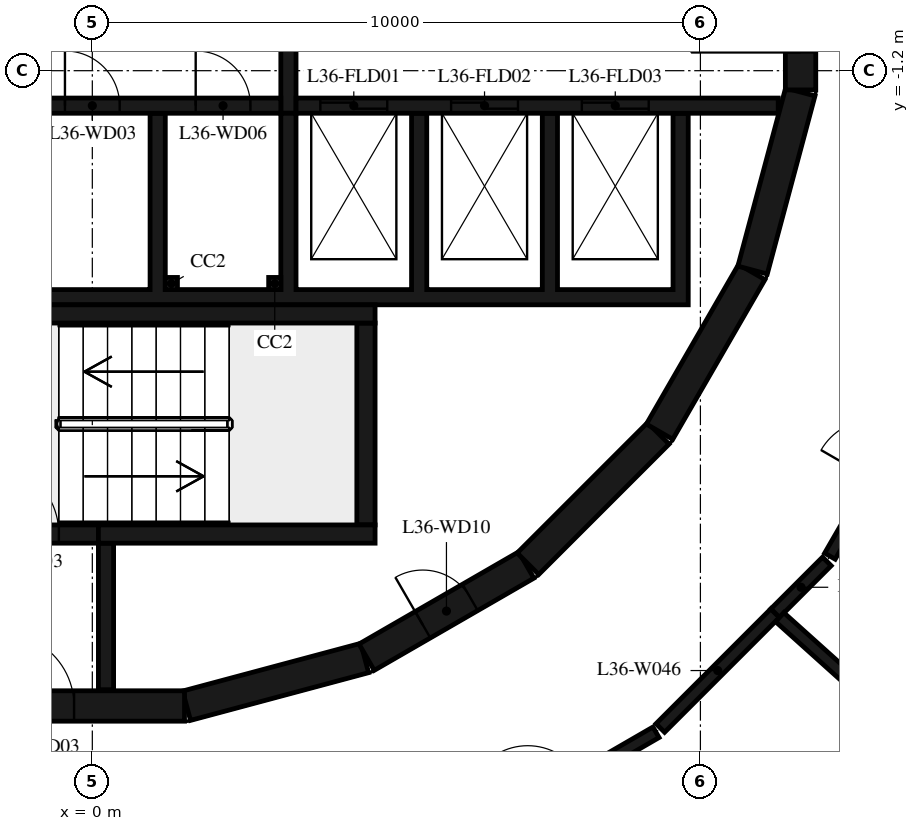
"""IFC4 building model, lengths in metres.
Left out: names, types, materials, properties, quantities, classifications, styles, units other than length and angle.
Written with IfcOpenShell. Run it as: python <this file> out.ifc"""

import sys

from ifc_helpers import new_model, si_unit, direction, frame, frame_2d, origin, origin_2d, place, context, subcontext, project, spatial, polyline, rectangle, outline, extrude, element, fill, save


model = new_model("IFC4")
c1 = context("Model", 3, precision=1e-05, world=origin(), true_north=direction((0.0, 1.0)))
c2 = subcontext(c1, "Body", "Model", "MODEL_VIEW")
j1 = project(units=[si_unit("LENGTHUNIT", "METRE"), si_unit("PLANEANGLEUNIT", "RADIAN")], contexts=[c1])
p1 = place(None, origin())
s1 = spatial("IfcSite", under=j1, at=p1, CompositionType="ELEMENT")
p2 = place(p1, origin())
s2 = spatial("IfcBuilding", under=s1, at=p2, CompositionType="ELEMENT")
p3 = place(p2, frame((0.0, 0.0, 144.9)))
s3 = spatial("IfcBuildingStorey", under=s2, at=p3, CompositionType="ELEMENT", Elevation=144.9)
for number, where, z_axis, x_axis in (
    (1, (1.3, -4.7, 0.0), (0.0, 0.0, 1.0), (1.0, 0.0, 0.0)),
    (2, (3.0, -4.7, 0.0), (0.0, 0.0, 1.0), (1.0, 0.0, 0.0)),
):
    element("IfcColumn", number, at=place(p3, frame(where, z_axis=z_axis, x_axis=x_axis)), inside=s3, PredefinedType="COLUMN", context=c2, shape_type="SweptSolid", body=[
        extrude(rectangle(XDim=0.2, YDim=0.2, at=origin_2d()), origin(), (0.0, 0.0, 1.0), 4.75),
    ])
p4 = place(p3, frame((1.55, -11.643, 0.0), z_axis=(0.0, 0.0, 1.0), x_axis=(0.965948410781, 0.258734743916, 0.0)))
e3 = element("IfcWall", 3, at=p4, inside=s3, PredefinedType="SHEAR", context=c2, shape_type="SweptSolid", body=[
    extrude(rectangle(XDim=3.033, YDim=0.5, at=frame_2d((1.516, 0.0))), origin(), (0.0, 0.0, 1.0), 6.35),
])
p5 = place(p3, frame((4.51, -10.845, 0.0), z_axis=(0.0, 0.0, 1.0), x_axis=(0.865975092491, 0.500087131594, 0.0)))
e4 = element("IfcWall", 4, at=p5, inside=s3, PredefinedType="SHEAR", context=c2, shape_type="SweptSolid", body=[
    extrude(rectangle(XDim=3.033, YDim=0.5, at=frame_2d((1.516, 0.0))), origin(), (0.0, 0.0, 1.0), 6.35),
])
p6 = place(p5, frame((1.066, 0.0, 0.0)))
e5 = element("IfcOpeningElement", 5, at=p6, cuts=e4, PredefinedType="OPENING", context=c2, shape_type="SweptSolid", body=[
    extrude(rectangle(XDim=0.9, YDim=2.1, at=frame_2d((0.45, 1.05))), frame((0.0, 0.26, 0.0), z_axis=(0.0, -1.0, 0.0), x_axis=(1.0, 0.0, 0.0)), (0.0, 0.0, 1.0), 0.52),
])
p7 = place(p3, frame((7.164, -9.308, 0.0), z_axis=(0.0, 0.0, 1.0), x_axis=(0.707106781187, 0.707106781187, 0.0)))
e6 = element("IfcWall", 6, at=p7, inside=s3, PredefinedType="SHEAR", context=c2, shape_type="SweptSolid", body=[
    extrude(rectangle(XDim=3.032, YDim=0.5, at=frame_2d((1.516, 0.0))), origin(), (0.0, 0.0, 1.0), 6.35),
])
for number, where, z_axis, x_axis in (
    (7, (9.329, -7.137, 0.0), (0.0, 0.0, 1.0), (0.5, 0.866, 0.0)),
    (8, (10.858, -4.479, 0.0), (0.0, 0.0, 1.0), (0.259, 0.966, 0.0)),
):
    element("IfcWall", number, at=place(p3, frame(where, z_axis=z_axis, x_axis=x_axis)), inside=s3, PredefinedType="SHEAR", context=c2, shape_type="SweptSolid", body=[
        extrude(rectangle(XDim=3.033, YDim=0.5, at=frame_2d((1.516, 0.0))), origin(), (0.0, 0.0, 1.0), 6.35),
    ])
p8 = place(p3, frame((11.647, -1.516, 0.0), z_axis=(0.0, 0.0, 1.0), x_axis=(0.0, 1.0, 0.0)))
e9 = element("IfcWall", 9, at=p8, inside=s3, PredefinedType="SHEAR", context=c2, shape_type="SweptSolid", body=[
    extrude(rectangle(XDim=3.033, YDim=0.5, at=frame_2d((1.516, 0.0))), origin(), (0.0, 0.0, 1.0), 6.35),
])
p9 = place(p8, frame((0.616, 0.0, 0.0)))
e10 = element("IfcOpeningElement", 10, at=p9, cuts=e9, PredefinedType="OPENING", context=c2, shape_type="SweptSolid", body=[
    extrude(rectangle(XDim=1.8, YDim=2.1, at=frame_2d((0.9, 1.05))), frame((0.0, 0.26, 0.0), z_axis=(0.0, -1.0, 0.0), x_axis=(1.0, 0.0, 0.0)), (0.0, 0.0, 1.0), 0.52),
])
p10 = place(p3, frame((-1.516, -11.647, 0.0), z_axis=(0.0, 0.0, 1.0), x_axis=(1.0, 0.0, 0.0)))
e11 = element("IfcWall", 11, at=p10, inside=s3, PredefinedType="SHEAR", context=c2, shape_type="SweptSolid", body=[
    extrude(rectangle(XDim=3.033, YDim=0.5, at=frame_2d((1.516, 0.0))), origin(), (0.0, 0.0, 1.0), 6.35),
])
p11 = place(p10, frame((0.016, 0.0, 0.0)))
e12 = element("IfcOpeningElement", 12, at=p11, cuts=e11, PredefinedType="OPENING", context=c2, shape_type="SweptSolid", body=[
    extrude(rectangle(XDim=1.2, YDim=2.1, at=frame_2d((0.6, 1.05))), frame((0.0, 0.26, 0.0), z_axis=(0.0, -1.0, 0.0), x_axis=(1.0, 0.0, 0.0)), (0.0, 0.0, 1.0), 0.52),
])
p12 = place(p3, frame((-2.4, -5.2, 0.0), z_axis=(0.0, 0.0, 1.0), x_axis=(1.0, 0.0, 0.0)))
e13 = element("IfcWall", 13, at=p12, inside=s3, PredefinedType="SHEAR", context=c2, shape_type="SweptSolid", body=[
    extrude(rectangle(XDim=7.05, YDim=0.3, at=frame_2d((3.525, 0.0))), origin(), (0.0, 0.0, 1.0), 6.35),
])
p13 = place(p3, frame((4.5, -8.67, 0.0), z_axis=(0.0, 0.0, 1.0), x_axis=(0.0, 1.0, 0.0)))
e14 = element("IfcWall", 14, at=p13, inside=s3, PredefinedType="SHEAR", context=c2, shape_type="SweptSolid", body=[
    extrude(rectangle(XDim=3.32, YDim=0.3, at=frame_2d((1.66, 0.0))), origin(), (0.0, 0.0, 1.0), 6.35),
])
p14 = place(p3, frame((0.1, -8.82, 0.0), z_axis=(0.0, 0.0, 1.0), x_axis=(1.0, 0.0, 0.0)))
e15 = element("IfcWall", 15, at=p14, inside=s3, PredefinedType="SHEAR", context=c2, shape_type="SweptSolid", body=[
    extrude(rectangle(XDim=4.55, YDim=0.3, at=frame_2d((2.275, 0.0))), origin(), (0.0, 0.0, 1.0), 6.35),
])
p15 = place(p3, frame((-2.4, -8.82, 0.0), z_axis=(0.0, 0.0, 1.0), x_axis=(1.0, 0.0, 0.0)))
e16 = element("IfcWall", 16, at=p15, inside=s3, PredefinedType="SHEAR", context=c2, shape_type="SweptSolid", body=[
    extrude(rectangle(XDim=2.5, YDim=0.3, at=frame_2d((1.25, 0.0))), origin(), (0.0, 0.0, 1.0), 6.35),
])
p16 = place(p15, frame((0.65, 0.0, 0.0)))
e17 = element("IfcOpeningElement", 17, at=p16, cuts=e16, PredefinedType="OPENING", context=c2, shape_type="SweptSolid", body=[
    extrude(rectangle(XDim=1.2, YDim=2.1, at=frame_2d((0.6, 1.05))), frame((0.0, 0.16, 0.0), z_axis=(0.0, -1.0, 0.0), x_axis=(1.0, 0.0, 0.0)), (0.0, 0.0, 1.0), 0.32),
])
p17 = place(p3, frame((0.225, -8.97, 0.0), z_axis=(0.0, 0.0, 1.0), x_axis=(0.0, -1.0, 0.0)))
e18 = element("IfcWall", 18, at=p17, inside=s3, PredefinedType="SHEAR", context=c2, shape_type="SweptSolid", body=[
    extrude(rectangle(XDim=2.41, YDim=0.25, at=frame_2d((1.205, 0.0))), origin(), (0.0, 0.0, 1.0), 6.35),
])
p18 = place(p3, origin())
e19 = element("IfcWall", 19, at=p18, inside=s3, PredefinedType="SHEAR", context=c2, shape_type="SweptSolid", body=[
    extrude(outline(polyline([(9.8, -5.05), (9.8, -4.8), (9.8, -1.9), (9.55, -1.9), (9.55, -4.8), (7.65, -4.8), (7.65, -1.9), (7.4, -1.9), (7.4, -4.8), (5.5, -4.8), (5.5, -1.9), (5.25, -1.9), (5.25, -4.8), (3.35, -4.8), (3.35, -1.9), (3.1, -1.9), (3.1, -4.8), (1.2, -4.8), (1.2, -1.9), (0.95, -1.9), (0.95, -4.8), (-0.95, -4.8), (-0.95, -1.9), (-1.2, -1.9), (-1.2, -4.8), (-5.25, -4.8), (-5.25, -1.9), (-5.5, -1.9), (-5.5, -4.8), (-7.4, -4.8), (-7.4, -1.9), (-7.65, -1.9), (-7.65, -4.8), (-9.55, -4.8), (-9.55, -1.9), (-9.8, -1.9), (-9.8, -4.8), (-9.8, -5.05), (9.8, -5.05)])), origin(), (0.0, 0.0, 1.0), 6.35),
])
p19 = place(p3, frame((-11.28, -1.775, 0.0), z_axis=(0.0, 0.0, 1.0), x_axis=(1.0, 0.0, 0.0)))
e20 = element("IfcWall", 20, at=p19, inside=s3, PredefinedType="SHEAR", context=c2, shape_type="SweptSolid", body=[
    extrude(rectangle(XDim=14.38, YDim=0.25, at=frame_2d((7.19, 0.0))), origin(), (0.0, 0.0, 1.0), 6.35),
])
p20 = place(p19, frame((2.03, 0.0, 0.0)))
e21 = element("IfcOpeningElement", 21, at=p20, cuts=e20, PredefinedType="OPENING", context=c2, shape_type="SweptSolid", body=[
    extrude(rectangle(XDim=1.3, YDim=2.1, at=frame_2d((0.65, 1.05))), frame((0.0, 0.135, 0.0), z_axis=(0.0, -1.0, 0.0), x_axis=(1.0, 0.0, 0.0)), (0.0, 0.0, 1.0), 0.27),
])
p21 = place(p19, frame((4.18, 0.0, 0.0)))
e22 = element("IfcOpeningElement", 22, at=p21, cuts=e20, PredefinedType="OPENING", context=c2, shape_type="SweptSolid", body=[
    extrude(rectangle(XDim=1.3, YDim=2.1, at=frame_2d((0.65, 1.05))), frame((0.0, 0.135, 0.0), z_axis=(0.0, -1.0, 0.0), x_axis=(1.0, 0.0, 0.0)), (0.0, 0.0, 1.0), 0.27),
])
p22 = place(p19, frame((7.605, 0.0, 0.0)))
e23 = element("IfcOpeningElement", 23, at=p22, cuts=e20, PredefinedType="OPENING", context=c2, shape_type="SweptSolid", body=[
    extrude(rectangle(XDim=0.9, YDim=2.1, at=frame_2d((0.45, 1.05))), frame((0.0, 0.135, 0.0), z_axis=(0.0, -1.0, 0.0), x_axis=(1.0, 0.0, 0.0)), (0.0, 0.0, 1.0), 0.27),
])
p23 = place(p19, frame((10.83, 0.0, 0.0)))
e24 = element("IfcOpeningElement", 24, at=p23, cuts=e20, PredefinedType="OPENING", context=c2, shape_type="SweptSolid", body=[
    extrude(rectangle(XDim=0.9, YDim=2.1, at=frame_2d((0.45, 1.05))), frame((0.0, 0.135, 0.0), z_axis=(0.0, -1.0, 0.0), x_axis=(1.0, 0.0, 0.0)), (0.0, 0.0, 1.0), 0.27),
])
p24 = place(p19, frame((12.98, 0.0, 0.0)))
e25 = element("IfcOpeningElement", 25, at=p24, cuts=e20, PredefinedType="OPENING", context=c2, shape_type="SweptSolid", body=[
    extrude(rectangle(XDim=0.9, YDim=2.1, at=frame_2d((0.45, 1.05))), frame((0.0, 0.135, 0.0), z_axis=(0.0, -1.0, 0.0), x_axis=(1.0, 0.0, 0.0)), (0.0, 0.0, 1.0), 0.27),
])
p25 = place(p3, frame((3.35, -1.775, 0.0), z_axis=(0.0, 0.0, 1.0), x_axis=(1.0, 0.0, 0.0)))
e26 = element("IfcWall", 26, at=p25, inside=s3, PredefinedType="SHEAR", context=c2, shape_type="SweptSolid", body=[
    extrude(rectangle(XDim=7.93, YDim=0.25, at=frame_2d((3.965, 0.0))), origin(), (0.0, 0.0, 1.0), 6.35),
])
p26 = place(p25, frame((0.4, 0.0, 0.0)))
e27 = element("IfcOpeningElement", 27, at=p26, cuts=e26, PredefinedType="OPENING", context=c2, shape_type="SweptSolid", body=[
    extrude(rectangle(XDim=1.1, YDim=2.4, at=frame_2d((0.55, 1.2))), frame((0.0, 0.135, 0.0), z_axis=(0.0, -1.0, 0.0), x_axis=(1.0, 0.0, 0.0)), (0.0, 0.0, 1.0), 0.27),
])
p27 = place(p25, frame((2.55, 0.0, 0.0)))
e28 = element("IfcOpeningElement", 28, at=p27, cuts=e26, PredefinedType="OPENING", context=c2, shape_type="SweptSolid", body=[
    extrude(rectangle(XDim=1.1, YDim=2.4, at=frame_2d((0.55, 1.2))), frame((0.0, 0.135, 0.0), z_axis=(0.0, -1.0, 0.0), x_axis=(1.0, 0.0, 0.0)), (0.0, 0.0, 1.0), 0.27),
])
p28 = place(p25, frame((4.7, 0.0, 0.0)))
e29 = element("IfcOpeningElement", 29, at=p28, cuts=e26, PredefinedType="OPENING", context=c2, shape_type="SweptSolid", body=[
    extrude(rectangle(XDim=1.1, YDim=2.4, at=frame_2d((0.55, 1.2))), frame((0.0, 0.135, 0.0), z_axis=(0.0, -1.0, 0.0), x_axis=(1.0, 0.0, 0.0)), (0.0, 0.0, 1.0), 0.27),
])
p29 = place(p3, frame((3.225, -1.9, 0.0), z_axis=(0.0, 0.0, 1.0), x_axis=(0.0, 1.0, 0.0)))
e30 = element("IfcWall", 30, at=p29, inside=s3, PredefinedType="SHEAR", context=c2, shape_type="SweptSolid", body=[
    extrude(rectangle(XDim=3.8, YDim=0.25, at=frame_2d((1.9, 0.0))), origin(), (0.0, 0.0, 1.0), 6.35),
])
p30 = place(p3, frame((5.917, -14.02, 0.0), z_axis=(0.0, 0.0, 1.0), x_axis=(0.865601686425, 0.500733182901, 0.0)))
e31 = element("IfcWall", 31, at=p30, inside=s3, PredefinedType="PARTITIONING", context=c2, shape_type="SweptSolid", body=[
    extrude(rectangle(XDim=3.874, YDim=0.2, at=frame_2d((1.937, 0.0))), origin(), (0.0, 0.0, 1.0), 6.35),
])
p31 = place(p30, frame((1.437, 0.0, 0.0)))
e32 = element("IfcOpeningElement", 32, at=p31, cuts=e31, PredefinedType="OPENING", context=c2, shape_type="SweptSolid", body=[
    extrude(rectangle(XDim=1.0, YDim=2.1, at=frame_2d((0.5, 1.05))), frame((0.0, 0.11, 0.0), z_axis=(0.0, -1.0, 0.0), x_axis=(1.0, 0.0, 0.0)), (0.0, 0.0, 1.0), 0.22),
])
p32 = place(p3, frame((9.341, -12.009, 0.0), z_axis=(0.0, 0.0, 1.0), x_axis=(0.707106781187, 0.707106781187, 0.0)))
e33 = element("IfcWall", 33, at=p32, inside=s3, PredefinedType="PARTITIONING", context=c2, shape_type="SweptSolid", body=[
    extrude(rectangle(XDim=2.672, YDim=0.2, at=frame_2d((1.336, 0.0))), origin(), (0.0, 0.0, 1.0), 6.35),
])
p33 = place(p3, frame((11.23, -10.12, 0.0), z_axis=(0.0, 0.0, 1.0), x_axis=(0.707106781187, 0.707106781187, 0.0)))
e34 = element("IfcWall", 34, at=p33, inside=s3, PredefinedType="PARTITIONING", context=c2, shape_type="SweptSolid", body=[
    extrude(rectangle(XDim=1.202, YDim=0.2, at=frame_2d((0.601, 0.0))), origin(), (0.0, 0.0, 1.0), 6.35),
])
p34 = place(p3, frame((11.304, -10.187, 0.0), z_axis=(0.0, 0.0, 1.0), x_axis=(0.743847874898, -0.668348964995, 0.0)))
e35 = element("IfcWall", 35, at=p34, inside=s3, PredefinedType="PARTITIONING", context=c2, shape_type="SweptSolid", body=[
    extrude(rectangle(XDim=7.845, YDim=0.2, at=frame_2d((3.922, 0.0))), origin(), (0.0, 0.0, 1.0), 6.35),
])
p35 = place(p3, frame((12.13, -9.183, 0.0), z_axis=(0.0, 0.0, 1.0), x_axis=(0.500760497952, 0.865585884642, 0.0)))
e36 = element("IfcWall", 36, at=p35, inside=s3, PredefinedType="PARTITIONING", context=c2, shape_type="SweptSolid", body=[
    extrude(rectangle(XDim=3.874, YDim=0.2, at=frame_2d((1.937, 0.0))), origin(), (0.0, 0.0, 1.0), 6.35),
])
p36 = place(p35, frame((1.437, 0.0, 0.0)))
e37 = element("IfcOpeningElement", 37, at=p36, cuts=e36, PredefinedType="OPENING", context=c2, shape_type="SweptSolid", body=[
    extrude(rectangle(XDim=1.0, YDim=2.1, at=frame_2d((0.5, 1.05))), frame((0.0, 0.11, 0.0), z_axis=(0.0, -1.0, 0.0), x_axis=(1.0, 0.0, 0.0)), (0.0, 0.0, 1.0), 0.22),
])
p37 = place(p16, origin())
e38 = element("IfcDoor", 38, at=p37, inside=s3, OperationType="SINGLE_SWING_LEFT", PredefinedType="DOOR", context=c2, shape_type="SweptSolid", body=[
    extrude(rectangle(XDim=1.2, YDim=2.1, at=frame_2d((0.6, 1.05))), frame((0.0, 0.025, 0.0), z_axis=(0.0, -1.0, 0.0), x_axis=(1.0, 0.0, 0.0)), (0.0, 0.0, 1.0), 0.05),
])
fill(e17, e38)
p38 = place(p11, origin())
e39 = element("IfcDoor", 39, at=p38, inside=s3, OperationType="SINGLE_SWING_RIGHT", PredefinedType="DOOR", context=c2, shape_type="SweptSolid", body=[
    extrude(rectangle(XDim=1.2, YDim=2.1, at=frame_2d((0.6, 1.05))), frame((0.0, 0.025, 0.0), z_axis=(0.0, -1.0, 0.0), x_axis=(1.0, 0.0, 0.0)), (0.0, 0.0, 1.0), 0.05),
])
fill(e12, e39)
p39 = place(p9, origin())
e40 = element("IfcDoor", 40, at=p39, inside=s3, OperationType="DOUBLE_DOOR_SINGLE_SWING", PredefinedType="DOOR", context=c2, shape_type="SweptSolid", body=[
    extrude(rectangle(XDim=1.8, YDim=2.1, at=frame_2d((0.9, 1.05))), frame((0.0, 0.025, 0.0), z_axis=(0.0, -1.0, 0.0), x_axis=(1.0, 0.0, 0.0)), (0.0, 0.0, 1.0), 0.05),
])
fill(e10, e40)
p40 = place(p26, origin())
e41 = element("IfcDoor", 41, at=p40, inside=s3, OperationType="DOUBLE_DOOR_SLIDING", PredefinedType="DOOR", context=c2, shape_type="SweptSolid", body=[
    extrude(rectangle(XDim=1.1, YDim=2.4, at=frame_2d((0.55, 1.2))), frame((0.0, 0.025, 0.0), z_axis=(0.0, -1.0, 0.0), x_axis=(1.0, 0.0, 0.0)), (0.0, 0.0, 1.0), 0.05),
])
fill(e27, e41)
p41 = place(p27, origin())
e42 = element("IfcDoor", 42, at=p41, inside=s3, OperationType="DOUBLE_DOOR_SLIDING", PredefinedType="DOOR", context=c2, shape_type="SweptSolid", body=[
    extrude(rectangle(XDim=1.1, YDim=2.4, at=frame_2d((0.55, 1.2))), frame((0.0, 0.025, 0.0), z_axis=(0.0, -1.0, 0.0), x_axis=(1.0, 0.0, 0.0)), (0.0, 0.0, 1.0), 0.05),
])
fill(e28, e42)
p42 = place(p28, origin())
e43 = element("IfcDoor", 43, at=p42, inside=s3, OperationType="DOUBLE_DOOR_SLIDING", PredefinedType="DOOR", context=c2, shape_type="SweptSolid", body=[
    extrude(rectangle(XDim=1.1, YDim=2.4, at=frame_2d((0.55, 1.2))), frame((0.0, 0.025, 0.0), z_axis=(0.0, -1.0, 0.0), x_axis=(1.0, 0.0, 0.0)), (0.0, 0.0, 1.0), 0.05),
])
fill(e29, e43)
p43 = place(p23, origin())
e44 = element("IfcDoor", 44, at=p43, inside=s3, OperationType="SINGLE_SWING_RIGHT", PredefinedType="DOOR", context=c2, shape_type="SweptSolid", body=[
    extrude(rectangle(XDim=0.9, YDim=2.1, at=frame_2d((0.45, 1.05))), frame((0.0, 0.025, 0.0), z_axis=(0.0, -1.0, 0.0), x_axis=(1.0, 0.0, 0.0)), (0.0, 0.0, 1.0), 0.05),
])
fill(e24, e44)
p44 = place(p24, origin())
e45 = element("IfcDoor", 45, at=p44, inside=s3, OperationType="SINGLE_SWING_LEFT", PredefinedType="DOOR", context=c2, shape_type="SweptSolid", body=[
    extrude(rectangle(XDim=0.9, YDim=2.1, at=frame_2d((0.45, 1.05))), frame((0.0, 0.025, 0.0), z_axis=(0.0, -1.0, 0.0), x_axis=(1.0, 0.0, 0.0)), (0.0, 0.0, 1.0), 0.05),
])
fill(e25, e45)
p45 = place(p6, origin())
e46 = element("IfcDoor", 46, at=p45, inside=s3, OperationType="SINGLE_SWING_LEFT", PredefinedType="DOOR", context=c2, shape_type="SweptSolid", body=[
    extrude(rectangle(XDim=0.9, YDim=2.1, at=frame_2d((0.45, 1.05))), frame((0.0, 0.025, 0.0), z_axis=(0.0, -1.0, 0.0), x_axis=(1.0, 0.0, 0.0)), (0.0, 0.0, 1.0), 0.05),
])
fill(e5, e46)
save(model, sys.argv[1])
